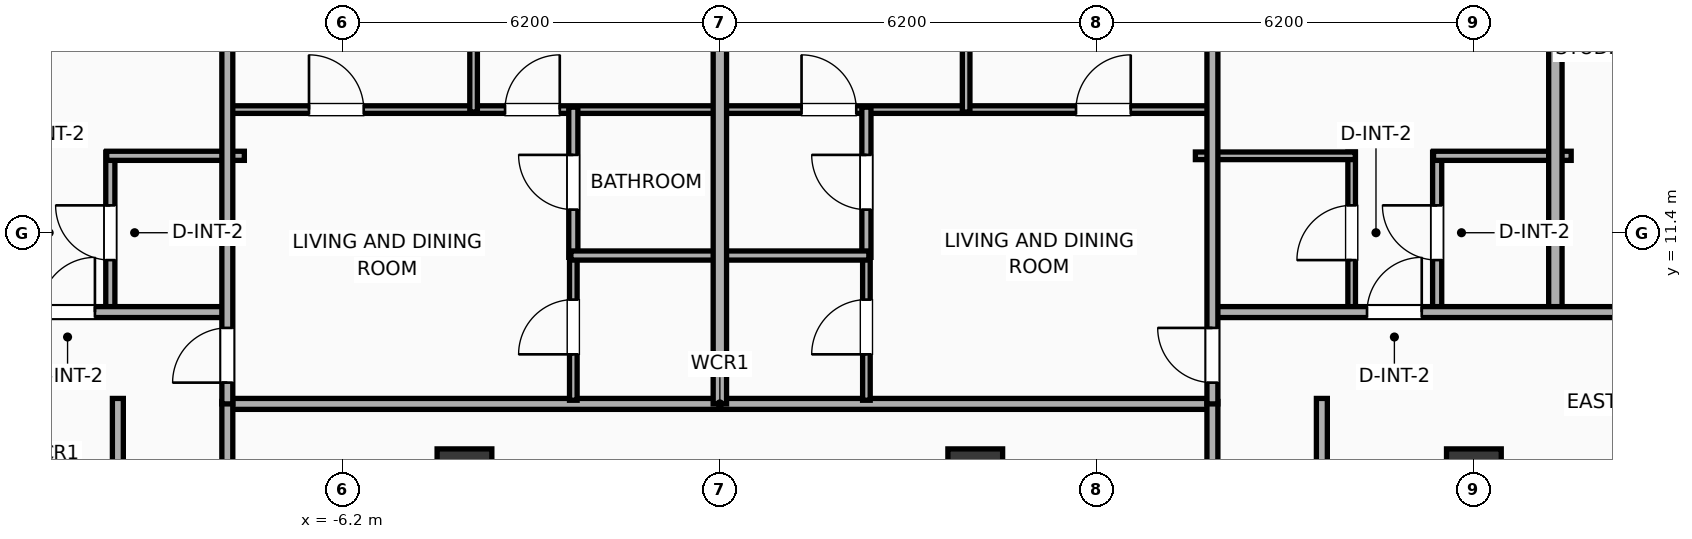
"""IFC4 building model, lengths in metres.
Left out: names, types, materials, properties, quantities, classifications, styles, units other than length and angle.
Written with IfcOpenShell. Run it as: python <this file> out.ifc"""

import sys

from ifc_helpers import new_model, si_unit, direction, frame, frame_2d, origin, origin_2d, place, context, subcontext, project, spatial, rectangle, extrude, element, fill, save


model = new_model("IFC4")
c1 = context("Model", 3, precision=1e-05, world=origin(), true_north=direction((0.0, 1.0)))
c2 = subcontext(c1, "Body", "Model", "MODEL_VIEW")
j1 = project(units=[si_unit("LENGTHUNIT", "METRE"), si_unit("PLANEANGLEUNIT", "RADIAN")], contexts=[c1])
p1 = place(None, origin())
s1 = spatial("IfcSite", under=j1, at=p1, CompositionType="ELEMENT")
p2 = place(p1, origin())
s2 = spatial("IfcBuilding", under=s1, at=p2, CompositionType="ELEMENT")
p3 = place(p2, frame((0.0, 0.0, 167.7)))
s3 = spatial("IfcBuildingStorey", under=s2, at=p3, CompositionType="ELEMENT", Elevation=167.7)
for number, where, z_axis, x_axis in (
    (1, (12.4, 7.4, 0.0), (0.0, 0.0, 1.0), (1.0, 0.0, 0.0)),
    (2, (-4.2, 7.4, 0.0), (0.0, 0.0, 1.0), (1.0, 0.0, 0.0)),
    (3, (4.2, 7.4, 0.0), (0.0, 0.0, 1.0), (1.0, 0.0, 0.0)),
):
    element("IfcColumn", number, at=place(p3, frame(where, z_axis=z_axis, x_axis=x_axis)), inside=s3, PredefinedType="COLUMN", context=c2, shape_type="SweptSolid", body=[
        extrude(rectangle(XDim=0.9, YDim=0.9, at=origin_2d()), origin(), (0.0, 0.0, 1.0), 3.9),
    ])
p4 = place(p3, frame((-9.9, -8.68, 0.0), z_axis=(0.0, 0.0, 1.0), x_axis=(0.0, 1.0, 0.0)))
e4 = element("IfcWall", 4, at=p4, inside=s3, PredefinedType="PARTITIONING", context=c2, shape_type="SweptSolid", body=[
    extrude(rectangle(XDim=17.36, YDim=0.18, at=frame_2d((8.68, 0.0))), origin(), (0.0, 0.0, 1.0), 3.65),
])
p5 = place(p4, frame((7.262, 0.0, 0.0)))
e5 = element("IfcOpeningElement", 5, at=p5, cuts=e4, PredefinedType="OPENING", context=c2, shape_type="SweptSolid", body=[
    extrude(rectangle(XDim=1.1, YDim=2.05, at=frame_2d((0.55, 1.025))), frame((0.0, 0.1, 0.0), z_axis=(0.0, -1.0, 0.0), x_axis=(1.0, 0.0, 0.0)), (0.0, 0.0, 1.0), 0.2),
])
p6 = place(p3, frame((9.9, -8.68, 0.0), z_axis=(0.0, 0.0, 1.0), x_axis=(0.0, 1.0, 0.0)))
e6 = element("IfcWall", 6, at=p6, inside=s3, PredefinedType="PARTITIONING", context=c2, shape_type="SweptSolid", body=[
    extrude(rectangle(XDim=17.36, YDim=0.18, at=frame_2d((8.68, 0.0))), origin(), (0.0, 0.0, 1.0), 3.65),
])
p7 = place(p6, frame((7.262, 0.0, 0.0)))
e7 = element("IfcOpeningElement", 7, at=p7, cuts=e6, PredefinedType="OPENING", context=c2, shape_type="SweptSolid", body=[
    extrude(rectangle(XDim=1.1, YDim=2.05, at=frame_2d((0.55, 1.025))), frame((0.0, 0.1, 0.0), z_axis=(0.0, -1.0, 0.0), x_axis=(1.0, 0.0, 0.0)), (0.0, 0.0, 1.0), 0.2),
])
p8 = place(p3, frame((-8.15, 8.59, 0.0), z_axis=(0.0, 0.0, 1.0), x_axis=(1.0, 0.0, 0.0)))
e8 = element("IfcWall", 8, at=p8, inside=s3, PredefinedType="PARTITIONING", context=c2, shape_type="SweptSolid", body=[
    extrude(rectangle(XDim=16.3, YDim=0.18, at=frame_2d((8.15, 0.0))), origin(), (0.0, 0.0, 1.0), 3.65),
])
for number, where, z_axis, x_axis in (
    (9, (-8.1, 0.92, 0.0), (0.0, 0.0, 1.0), (0.0, 1.0, 0.0)),
    (10, (8.1, 0.92, 0.0), (0.0, 0.0, 1.0), (0.0, 1.0, 0.0)),
):
    element("IfcWall", number, at=place(p3, frame(where, z_axis=z_axis, x_axis=x_axis)), inside=s3, PredefinedType="PARTITIONING", context=c2, shape_type="SweptSolid", body=[
        extrude(rectangle(XDim=7.71, YDim=0.18, at=frame_2d((3.855, 0.0))), origin(), (0.0, 0.0, 1.0), 3.65),
    ])
p9 = place(p3, frame((-10.024, 10.08, 0.0), z_axis=(0.0, 0.0, 1.0), x_axis=(0.0, 1.0, 0.0)))
e11 = element("IfcWall", 11, at=p9, inside=s3, PredefinedType="PLUMBINGWALL", context=c2, shape_type="SweptSolid", body=[
    extrude(rectangle(XDim=2.65, YDim=0.15, at=frame_2d((1.325, 0.0))), origin(), (0.0, 0.0, 1.0), 3.65),
])
p10 = place(p9, frame((0.875, 0.0, 0.0)))
e12 = element("IfcOpeningElement", 12, at=p10, cuts=e11, PredefinedType="OPENING", context=c2, shape_type="SweptSolid", body=[
    extrude(rectangle(XDim=0.9, YDim=2.05, at=frame_2d((0.45, 1.025))), frame((0.0, 0.085, 0.0), z_axis=(0.0, -1.0, 0.0), x_axis=(1.0, 0.0, 0.0)), (0.0, 0.0, 1.0), 0.17),
])
p11 = place(p3, frame((-10.084, 12.67, 0.0), z_axis=(0.0, 0.0, 1.0), x_axis=(1.0, 0.0, 0.0)))
e13 = element("IfcWall", 13, at=p11, inside=s3, PredefinedType="PLUMBINGWALL", context=c2, shape_type="SweptSolid", body=[
    extrude(rectangle(XDim=2.264, YDim=0.15, at=frame_2d((1.132, 0.0))), origin(), (0.0, 0.0, 1.0), 3.65),
])
p12 = place(p3, frame((10.39, 10.08, 0.0), z_axis=(0.0, 0.0, 1.0), x_axis=(0.0, 1.0, 0.0)))
e14 = element("IfcWall", 14, at=p12, inside=s3, PredefinedType="PARTITIONING", context=c2, shape_type="SweptSolid", body=[
    extrude(rectangle(XDim=2.65, YDim=0.125, at=frame_2d((1.325, 0.0))), origin(), (0.0, 0.0, 1.0), 3.65),
])
p13 = place(p12, frame((0.875, 0.0, 0.0)))
e15 = element("IfcOpeningElement", 15, at=p13, cuts=e14, PredefinedType="OPENING", context=c2, shape_type="SweptSolid", body=[
    extrude(rectangle(XDim=0.9, YDim=2.05, at=frame_2d((0.45, 1.025))), frame((0.0, 0.073, 0.0), z_axis=(0.0, -1.0, 0.0), x_axis=(1.0, 0.0, 0.0)), (0.0, 0.0, 1.0), 0.145),
])
p14 = place(p3, frame((11.796, 10.08, 0.0), z_axis=(0.0, 0.0, 1.0), x_axis=(0.0, 1.0, 0.0)))
e16 = element("IfcWall", 16, at=p14, inside=s3, PredefinedType="PLUMBINGWALL", context=c2, shape_type="SweptSolid", body=[
    extrude(rectangle(XDim=2.65, YDim=0.15, at=frame_2d((1.325, 0.0))), origin(), (0.0, 0.0, 1.0), 3.04),
])
p15 = place(p14, frame((0.875, 0.0, 0.0)))
e17 = element("IfcOpeningElement", 17, at=p15, cuts=e16, PredefinedType="OPENING", context=c2, shape_type="SweptSolid", body=[
    extrude(rectangle(XDim=0.9, YDim=2.05, at=frame_2d((0.45, 1.025))), frame((0.0, 0.085, 0.0), z_axis=(0.0, -1.0, 0.0), x_axis=(1.0, 0.0, 0.0)), (0.0, 0.0, 1.0), 0.17),
])
p16 = place(p3, frame((7.82, 12.67, 0.0), z_axis=(0.0, 0.0, 1.0), x_axis=(1.0, 0.0, 0.0)))
e18 = element("IfcWall", 18, at=p16, inside=s3, PredefinedType="PARTITIONING", context=c2, shape_type="SweptSolid", body=[
    extrude(rectangle(XDim=2.63, YDim=0.125, at=frame_2d((1.315, 0.0))), origin(), (0.0, 0.0, 1.0), 3.65),
])
p17 = place(p3, frame((11.736, 12.67, 0.0), z_axis=(0.0, 0.0, 1.0), x_axis=(1.0, 0.0, 0.0)))
e19 = element("IfcWall", 19, at=p17, inside=s3, PredefinedType="PLUMBINGWALL", context=c2, shape_type="SweptSolid", body=[
    extrude(rectangle(XDim=2.264, YDim=0.15, at=frame_2d((1.132, 0.0))), origin(), (0.0, 0.0, 1.0), 3.65),
])
p18 = place(p3, frame((13.74, 10.02, 0.0), z_axis=(0.0, 0.0, 1.0), x_axis=(0.0, 1.0, 0.0)))
e20 = element("IfcWall", 20, at=p18, inside=s3, PredefinedType="PARTITIONING", context=c2, shape_type="SweptSolid", body=[
    extrude(rectangle(XDim=11.502, YDim=0.22, at=frame_2d((5.751, 0.0))), origin(), (0.0, 0.0, 1.0), 3.65),
])
p19 = place(p3, frame((-19.5, 10.1, 0.0), z_axis=(0.0, 0.0, 1.0), x_axis=(1.0, 0.0, 0.0)))
e21 = element("IfcWall", 21, at=p19, inside=s3, PredefinedType="PARTITIONING", context=c2, shape_type="SweptSolid", body=[
    extrude(rectangle(XDim=11.42, YDim=0.18, at=frame_2d((5.71, 0.0))), origin(), (0.0, 0.0, 1.0), 3.65),
])
p20 = place(p19, frame((3.464, 0.0, 0.0)))
e22 = element("IfcOpeningElement", 22, at=p20, cuts=e21, PredefinedType="OPENING", context=c2, shape_type="SweptSolid", body=[
    extrude(rectangle(XDim=1.15, YDim=2.05, at=frame_2d((0.575, 1.025))), frame((0.0, 0.1, 0.0), z_axis=(0.0, -1.0, 0.0), x_axis=(1.0, 0.0, 0.0)), (0.0, 0.0, 1.0), 0.2),
])
p21 = place(p19, frame((8.323, 0.0, 0.0)))
e23 = element("IfcOpeningElement", 23, at=p21, cuts=e21, PredefinedType="OPENING", context=c2, shape_type="SweptSolid", body=[
    extrude(rectangle(XDim=0.9, YDim=2.05, at=frame_2d((0.45, 1.025))), frame((0.0, 0.1, 0.0), z_axis=(0.0, -1.0, 0.0), x_axis=(1.0, 0.0, 0.0)), (0.0, 0.0, 1.0), 0.2),
])
p22 = place(p3, frame((8.08, 10.1, 0.0), z_axis=(0.0, 0.0, 1.0), x_axis=(1.0, 0.0, 0.0)))
e24 = element("IfcWall", 24, at=p22, inside=s3, PredefinedType="PARTITIONING", context=c2, shape_type="SweptSolid", body=[
    extrude(rectangle(XDim=11.42, YDim=0.18, at=frame_2d((5.71, 0.0))), origin(), (0.0, 0.0, 1.0), 3.65),
])
p23 = place(p22, frame((2.562, 0.0, 0.0)))
e25 = element("IfcOpeningElement", 25, at=p23, cuts=e24, PredefinedType="OPENING", context=c2, shape_type="SweptSolid", body=[
    extrude(rectangle(XDim=0.9, YDim=2.05, at=frame_2d((0.45, 1.025))), frame((0.0, 0.1, 0.0), z_axis=(0.0, -1.0, 0.0), x_axis=(1.0, 0.0, 0.0)), (0.0, 0.0, 1.0), 0.2),
])
p24 = place(p22, frame((6.853, 0.0, 0.0)))
e26 = element("IfcOpeningElement", 26, at=p24, cuts=e24, PredefinedType="OPENING", context=c2, shape_type="SweptSolid", body=[
    extrude(rectangle(XDim=1.15, YDim=2.05, at=frame_2d((0.575, 1.025))), frame((0.0, 0.1, 0.0), z_axis=(0.0, -1.0, 0.0), x_axis=(1.0, 0.0, 0.0)), (0.0, 0.0, 1.0), 0.2),
])
p25 = place(p3, frame((-8.08, 13.43, 0.0), z_axis=(0.0, 0.0, 1.0), x_axis=(1.0, 0.0, 0.0)))
e27 = element("IfcWall", 27, at=p25, inside=s3, PredefinedType="PARTITIONING", context=c2, shape_type="SweptSolid", body=[
    extrude(rectangle(XDim=8.06, YDim=0.125, at=frame_2d((4.03, 0.0))), origin(), (0.0, 0.0, 1.0), 3.65),
])
p26 = place(p25, frame((1.323, 0.0, 0.0)))
e28 = element("IfcOpeningElement", 28, at=p26, cuts=e27, PredefinedType="OPENING", context=c2, shape_type="SweptSolid", body=[
    extrude(rectangle(XDim=0.9, YDim=2.05, at=frame_2d((0.45, 1.025))), frame((0.0, 0.073, 0.0), z_axis=(0.0, -1.0, 0.0), x_axis=(1.0, 0.0, 0.0)), (0.0, 0.0, 1.0), 0.145),
])
p27 = place(p25, frame((4.547, 0.0, 0.0)))
e29 = element("IfcOpeningElement", 29, at=p27, cuts=e27, PredefinedType="OPENING", context=c2, shape_type="SweptSolid", body=[
    extrude(rectangle(XDim=0.9, YDim=2.05, at=frame_2d((0.45, 1.025))), frame((0.0, 0.073, 0.0), z_axis=(0.0, -1.0, 0.0), x_axis=(1.0, 0.0, 0.0)), (0.0, 0.0, 1.0), 0.145),
])
p28 = place(p3, frame((-2.41, 8.65, 0.0), z_axis=(0.0, 0.0, 1.0), x_axis=(0.0, 1.0, 0.0)))
e30 = element("IfcWall", 30, at=p28, inside=s3, PredefinedType="PARTITIONING", context=c2, shape_type="SweptSolid", body=[
    extrude(rectangle(XDim=2.41, YDim=0.125, at=frame_2d((1.205, 0.0))), origin(), (0.0, 0.0, 1.0), 3.65),
])
p29 = place(p28, frame((0.755, 0.0, 0.0)))
e31 = element("IfcOpeningElement", 31, at=p29, cuts=e30, PredefinedType="OPENING", context=c2, shape_type="SweptSolid", body=[
    extrude(rectangle(XDim=0.9, YDim=2.05, at=frame_2d((0.45, 1.025))), frame((0.0, 0.073, 0.0), z_axis=(0.0, -1.0, 0.0), x_axis=(1.0, 0.0, 0.0)), (0.0, 0.0, 1.0), 0.145),
])
p30 = place(p3, frame((-2.41, 11.0, 0.0), z_axis=(0.0, 0.0, 1.0), x_axis=(0.0, 1.0, 0.0)))
e32 = element("IfcWall", 32, at=p30, inside=s3, PredefinedType="PLUMBINGWALL", context=c2, shape_type="SweptSolid", body=[
    extrude(rectangle(XDim=2.47, YDim=0.15, at=frame_2d((1.235, 0.0))), origin(), (0.0, 0.0, 1.0), 3.04),
])
p31 = place(p30, frame((0.785, 0.0, 0.0)))
e33 = element("IfcOpeningElement", 33, at=p31, cuts=e32, PredefinedType="OPENING", context=c2, shape_type="SweptSolid", body=[
    extrude(rectangle(XDim=0.9, YDim=2.05, at=frame_2d((0.45, 1.025))), frame((0.0, 0.085, 0.0), z_axis=(0.0, -1.0, 0.0), x_axis=(1.0, 0.0, 0.0)), (0.0, 0.0, 1.0), 0.17),
])
p32 = place(p3, frame((-2.45, 11.03, 0.0), z_axis=(0.0, 0.0, 1.0), x_axis=(1.0, 0.0, 0.0)))
e34 = element("IfcWall", 34, at=p32, inside=s3, PredefinedType="PLUMBINGWALL", context=c2, shape_type="SweptSolid", body=[
    extrude(rectangle(XDim=2.43, YDim=0.15, at=frame_2d((1.215, 0.0))), origin(), (0.0, 0.0, 1.0), 3.65),
])
p33 = place(p3, frame((-4.05, 13.39, 0.0), z_axis=(0.0, 0.0, 1.0), x_axis=(0.0, 1.0, 0.0)))
e35 = element("IfcWall", 35, at=p33, inside=s3, PredefinedType="PARTITIONING", context=c2, shape_type="SweptSolid", body=[
    extrude(rectangle(XDim=6.262, YDim=0.125, at=frame_2d((3.131, 0.0))), origin(), (0.0, 0.0, 1.0), 3.65),
])
p34 = place(p3, frame((-8.1, 8.59, 0.0), z_axis=(0.0, 0.0, 1.0), x_axis=(0.0, 1.0, 0.0)))
e36 = element("IfcWall", 36, at=p34, inside=s3, PredefinedType="PARTITIONING", context=c2, shape_type="SweptSolid", body=[
    extrude(rectangle(XDim=10.636, YDim=0.18, at=frame_2d((5.318, 0.0))), origin(), (0.0, 0.0, 1.0), 3.65),
])
p35 = place(p34, frame((0.35, 0.0, 0.0)))
e37 = element("IfcOpeningElement", 37, at=p35, cuts=e36, PredefinedType="OPENING", context=c2, shape_type="SweptSolid", body=[
    extrude(rectangle(XDim=0.9, YDim=2.05, at=frame_2d((0.45, 1.025))), frame((0.0, 0.1, 0.0), z_axis=(0.0, -1.0, 0.0), x_axis=(1.0, 0.0, 0.0)), (0.0, 0.0, 1.0), 0.2),
])
p36 = place(p3, frame((0.02, 13.43, 0.0), z_axis=(0.0, 0.0, 1.0), x_axis=(1.0, 0.0, 0.0)))
e38 = element("IfcWall", 38, at=p36, inside=s3, PredefinedType="PARTITIONING", context=c2, shape_type="SweptSolid", body=[
    extrude(rectangle(XDim=8.06, YDim=0.125, at=frame_2d((4.03, 0.0))), origin(), (0.0, 0.0, 1.0), 3.65),
])
p37 = place(p36, frame((1.323, 0.0, 0.0)))
e39 = element("IfcOpeningElement", 39, at=p37, cuts=e38, PredefinedType="OPENING", context=c2, shape_type="SweptSolid", body=[
    extrude(rectangle(XDim=0.9, YDim=2.05, at=frame_2d((0.45, 1.025))), frame((0.0, 0.073, 0.0), z_axis=(0.0, -1.0, 0.0), x_axis=(1.0, 0.0, 0.0)), (0.0, 0.0, 1.0), 0.145),
])
p38 = place(p36, frame((5.837, 0.0, 0.0)))
e40 = element("IfcOpeningElement", 40, at=p38, cuts=e38, PredefinedType="OPENING", context=c2, shape_type="SweptSolid", body=[
    extrude(rectangle(XDim=0.9, YDim=2.05, at=frame_2d((0.45, 1.025))), frame((0.0, 0.073, 0.0), z_axis=(0.0, -1.0, 0.0), x_axis=(1.0, 0.0, 0.0)), (0.0, 0.0, 1.0), 0.145),
])
p39 = place(p3, frame((2.41, 8.65, 0.0), z_axis=(0.0, 0.0, 1.0), x_axis=(0.0, 1.0, 0.0)))
e41 = element("IfcWall", 41, at=p39, inside=s3, PredefinedType="PARTITIONING", context=c2, shape_type="SweptSolid", body=[
    extrude(rectangle(XDim=2.41, YDim=0.125, at=frame_2d((1.205, 0.0))), origin(), (0.0, 0.0, 1.0), 3.65),
])
p40 = place(p39, frame((0.755, 0.0, 0.0)))
e42 = element("IfcOpeningElement", 42, at=p40, cuts=e41, PredefinedType="OPENING", context=c2, shape_type="SweptSolid", body=[
    extrude(rectangle(XDim=0.9, YDim=2.05, at=frame_2d((0.45, 1.025))), frame((0.0, 0.073, 0.0), z_axis=(0.0, -1.0, 0.0), x_axis=(1.0, 0.0, 0.0)), (0.0, 0.0, 1.0), 0.145),
])
p41 = place(p3, frame((2.41, 11.0, 0.0), z_axis=(0.0, 0.0, 1.0), x_axis=(0.0, 1.0, 0.0)))
e43 = element("IfcWall", 43, at=p41, inside=s3, PredefinedType="PLUMBINGWALL", context=c2, shape_type="SweptSolid", body=[
    extrude(rectangle(XDim=2.47, YDim=0.15, at=frame_2d((1.235, 0.0))), origin(), (0.0, 0.0, 1.0), 3.65),
])
p42 = place(p41, frame((0.785, 0.0, 0.0)))
e44 = element("IfcOpeningElement", 44, at=p42, cuts=e43, PredefinedType="OPENING", context=c2, shape_type="SweptSolid", body=[
    extrude(rectangle(XDim=0.9, YDim=2.05, at=frame_2d((0.45, 1.025))), frame((0.0, 0.085, 0.0), z_axis=(0.0, -1.0, 0.0), x_axis=(1.0, 0.0, 0.0)), (0.0, 0.0, 1.0), 0.17),
])
p43 = place(p3, frame((0.02, 11.03, 0.0), z_axis=(0.0, 0.0, 1.0), x_axis=(1.0, 0.0, 0.0)))
e45 = element("IfcWall", 45, at=p43, inside=s3, PredefinedType="PLUMBINGWALL", context=c2, shape_type="SweptSolid", body=[
    extrude(rectangle(XDim=2.43, YDim=0.15, at=frame_2d((1.215, 0.0))), origin(), (0.0, 0.0, 1.0), 3.65),
])
p44 = place(p3, frame((4.05, 13.39, 0.0), z_axis=(0.0, 0.0, 1.0), x_axis=(0.0, 1.0, 0.0)))
e46 = element("IfcWall", 46, at=p44, inside=s3, PredefinedType="PARTITIONING", context=c2, shape_type="SweptSolid", body=[
    extrude(rectangle(XDim=7.114, YDim=0.125, at=frame_2d((3.557, 0.0))), origin(), (0.0, 0.0, 1.0), 3.65),
])
p45 = place(p3, frame((8.1, 8.59, 0.0), z_axis=(0.0, 0.0, 1.0), x_axis=(0.0, 1.0, 0.0)))
e47 = element("IfcWall", 47, at=p45, inside=s3, PredefinedType="PARTITIONING", context=c2, shape_type="SweptSolid", body=[
    extrude(rectangle(XDim=12.339, YDim=0.18, at=frame_2d((6.169, 0.0))), origin(), (0.0, 0.0, 1.0), 3.65),
])
p46 = place(p45, frame((0.35, 0.0, 0.0)))
e48 = element("IfcOpeningElement", 48, at=p46, cuts=e47, PredefinedType="OPENING", context=c2, shape_type="SweptSolid", body=[
    extrude(rectangle(XDim=0.9, YDim=2.05, at=frame_2d((0.45, 1.025))), frame((0.0, 0.1, 0.0), z_axis=(0.0, -1.0, 0.0), x_axis=(1.0, 0.0, 0.0)), (0.0, 0.0, 1.0), 0.2),
])
p47 = place(p3, frame((0.0, 8.59, 0.0), z_axis=(0.0, 0.0, 1.0), x_axis=(0.0, 1.0, 0.0)))
e49 = element("IfcWall", 49, at=p47, inside=s3, PredefinedType="PARTITIONING", context=c2, shape_type="SweptSolid", body=[
    extrude(rectangle(XDim=11.488, YDim=0.22, at=frame_2d((5.744, 0.0))), origin(), (0.0, 0.0, 1.0), 3.04),
])
p48 = place(p10, origin())
e50 = element("IfcDoor", 50, at=p48, inside=s3, OperationType="SINGLE_SWING_RIGHT", PredefinedType="DOOR", context=c2, shape_type="SweptSolid", body=[
    extrude(rectangle(XDim=0.9, YDim=2.05, at=frame_2d((0.45, 1.025))), frame((0.0, 0.025, 0.0), z_axis=(0.0, -1.0, 0.0), x_axis=(1.0, 0.0, 0.0)), (0.0, 0.0, 1.0), 0.05),
])
fill(e12, e50)
p49 = place(p13, origin())
e51 = element("IfcDoor", 51, at=p49, inside=s3, OperationType="SINGLE_SWING_LEFT", PredefinedType="DOOR", context=c2, shape_type="SweptSolid", body=[
    extrude(rectangle(XDim=0.9, YDim=2.05, at=frame_2d((0.45, 1.025))), frame((0.0, 0.025, 0.0), z_axis=(0.0, -1.0, 0.0), x_axis=(1.0, 0.0, 0.0)), (0.0, 0.0, 1.0), 0.05),
])
fill(e15, e51)
p50 = place(p15, origin())
e52 = element("IfcDoor", 52, at=p50, inside=s3, OperationType="SINGLE_SWING_RIGHT", PredefinedType="DOOR", context=c2, shape_type="SweptSolid", body=[
    extrude(rectangle(XDim=0.9, YDim=2.05, at=frame_2d((0.45, 1.025))), frame((0.0, 0.025, 0.0), z_axis=(0.0, -1.0, 0.0), x_axis=(1.0, 0.0, 0.0)), (0.0, 0.0, 1.0), 0.05),
])
fill(e17, e52)
p51 = place(p21, origin())
e53 = element("IfcDoor", 53, at=p51, inside=s3, OperationType="SINGLE_SWING_RIGHT", PredefinedType="DOOR", context=c2, shape_type="SweptSolid", body=[
    extrude(rectangle(XDim=0.9, YDim=2.05, at=frame_2d((0.45, 1.025))), frame((0.0, 0.025, 0.0), z_axis=(0.0, -1.0, 0.0), x_axis=(1.0, 0.0, 0.0)), (0.0, 0.0, 1.0), 0.05),
])
fill(e23, e53)
p52 = place(p23, origin())
e54 = element("IfcDoor", 54, at=p52, inside=s3, OperationType="SINGLE_SWING_RIGHT", PredefinedType="DOOR", context=c2, shape_type="SweptSolid", body=[
    extrude(rectangle(XDim=0.9, YDim=2.05, at=frame_2d((0.45, 1.025))), frame((0.0, 0.025, 0.0), z_axis=(0.0, -1.0, 0.0), x_axis=(1.0, 0.0, 0.0)), (0.0, 0.0, 1.0), 0.05),
])
fill(e25, e54)
p53 = place(p26, origin())
e55 = element("IfcDoor", 55, at=p53, inside=s3, OperationType="SINGLE_SWING_LEFT", PredefinedType="DOOR", context=c2, shape_type="SweptSolid", body=[
    extrude(rectangle(XDim=0.9, YDim=2.05, at=frame_2d((0.45, 1.025))), frame((0.0, 0.025, 0.0), z_axis=(0.0, -1.0, 0.0), x_axis=(1.0, 0.0, 0.0)), (0.0, 0.0, 1.0), 0.05),
])
fill(e28, e55)
p54 = place(p27, origin())
e56 = element("IfcDoor", 56, at=p54, inside=s3, OperationType="SINGLE_SWING_RIGHT", PredefinedType="DOOR", context=c2, shape_type="SweptSolid", body=[
    extrude(rectangle(XDim=0.9, YDim=2.05, at=frame_2d((0.45, 1.025))), frame((0.0, 0.025, 0.0), z_axis=(0.0, -1.0, 0.0), x_axis=(1.0, 0.0, 0.0)), (0.0, 0.0, 1.0), 0.05),
])
fill(e29, e56)
p55 = place(p29, origin())
e57 = element("IfcDoor", 57, at=p55, inside=s3, OperationType="SINGLE_SWING_LEFT", PredefinedType="DOOR", context=c2, shape_type="SweptSolid", body=[
    extrude(rectangle(XDim=0.9, YDim=2.05, at=frame_2d((0.45, 1.025))), frame((0.0, 0.025, 0.0), z_axis=(0.0, -1.0, 0.0), x_axis=(1.0, 0.0, 0.0)), (0.0, 0.0, 1.0), 0.05),
])
fill(e31, e57)
p56 = place(p31, origin())
e58 = element("IfcDoor", 58, at=p56, inside=s3, OperationType="SINGLE_SWING_RIGHT", PredefinedType="DOOR", context=c2, shape_type="SweptSolid", body=[
    extrude(rectangle(XDim=0.9, YDim=2.05, at=frame_2d((0.45, 1.025))), frame((0.0, 0.025, 0.0), z_axis=(0.0, -1.0, 0.0), x_axis=(1.0, 0.0, 0.0)), (0.0, 0.0, 1.0), 0.05),
])
fill(e33, e58)
p57 = place(p35, origin())
e59 = element("IfcDoor", 59, at=p57, inside=s3, OperationType="SINGLE_SWING_LEFT", PredefinedType="DOOR", context=c2, shape_type="SweptSolid", body=[
    extrude(rectangle(XDim=0.9, YDim=2.05, at=frame_2d((0.45, 1.025))), frame((0.0, 0.025, 0.0), z_axis=(0.0, -1.0, 0.0), x_axis=(1.0, 0.0, 0.0)), (0.0, 0.0, 1.0), 0.05),
])
fill(e37, e59)
p58 = place(p37, origin())
e60 = element("IfcDoor", 60, at=p58, inside=s3, OperationType="SINGLE_SWING_LEFT", PredefinedType="DOOR", context=c2, shape_type="SweptSolid", body=[
    extrude(rectangle(XDim=0.9, YDim=2.05, at=frame_2d((0.45, 1.025))), frame((0.0, 0.025, 0.0), z_axis=(0.0, -1.0, 0.0), x_axis=(1.0, 0.0, 0.0)), (0.0, 0.0, 1.0), 0.05),
])
fill(e39, e60)
p59 = place(p38, origin())
e61 = element("IfcDoor", 61, at=p59, inside=s3, OperationType="SINGLE_SWING_RIGHT", PredefinedType="DOOR", context=c2, shape_type="SweptSolid", body=[
    extrude(rectangle(XDim=0.9, YDim=2.05, at=frame_2d((0.45, 1.025))), frame((0.0, 0.025, 0.0), z_axis=(0.0, -1.0, 0.0), x_axis=(1.0, 0.0, 0.0)), (0.0, 0.0, 1.0), 0.05),
])
fill(e40, e61)
p60 = place(p40, origin())
e62 = element("IfcDoor", 62, at=p60, inside=s3, OperationType="SINGLE_SWING_LEFT", PredefinedType="DOOR", context=c2, shape_type="SweptSolid", body=[
    extrude(rectangle(XDim=0.9, YDim=2.05, at=frame_2d((0.45, 1.025))), frame((0.0, 0.025, 0.0), z_axis=(0.0, -1.0, 0.0), x_axis=(1.0, 0.0, 0.0)), (0.0, 0.0, 1.0), 0.05),
])
fill(e42, e62)
p61 = place(p42, origin())
e63 = element("IfcDoor", 63, at=p61, inside=s3, OperationType="SINGLE_SWING_RIGHT", PredefinedType="DOOR", context=c2, shape_type="SweptSolid", body=[
    extrude(rectangle(XDim=0.9, YDim=2.05, at=frame_2d((0.45, 1.025))), frame((0.0, 0.025, 0.0), z_axis=(0.0, -1.0, 0.0), x_axis=(1.0, 0.0, 0.0)), (0.0, 0.0, 1.0), 0.05),
])
fill(e44, e63)
p62 = place(p46, origin())
e64 = element("IfcDoor", 64, at=p62, inside=s3, OperationType="SINGLE_SWING_RIGHT", PredefinedType="DOOR", context=c2, shape_type="SweptSolid", body=[
    extrude(rectangle(XDim=0.9, YDim=2.05, at=frame_2d((0.45, 1.025))), frame((0.0, 0.025, 0.0), z_axis=(0.0, -1.0, 0.0), x_axis=(1.0, 0.0, 0.0)), (0.0, 0.0, 1.0), 0.05),
])
fill(e48, e64)
save(model, sys.argv[1])
